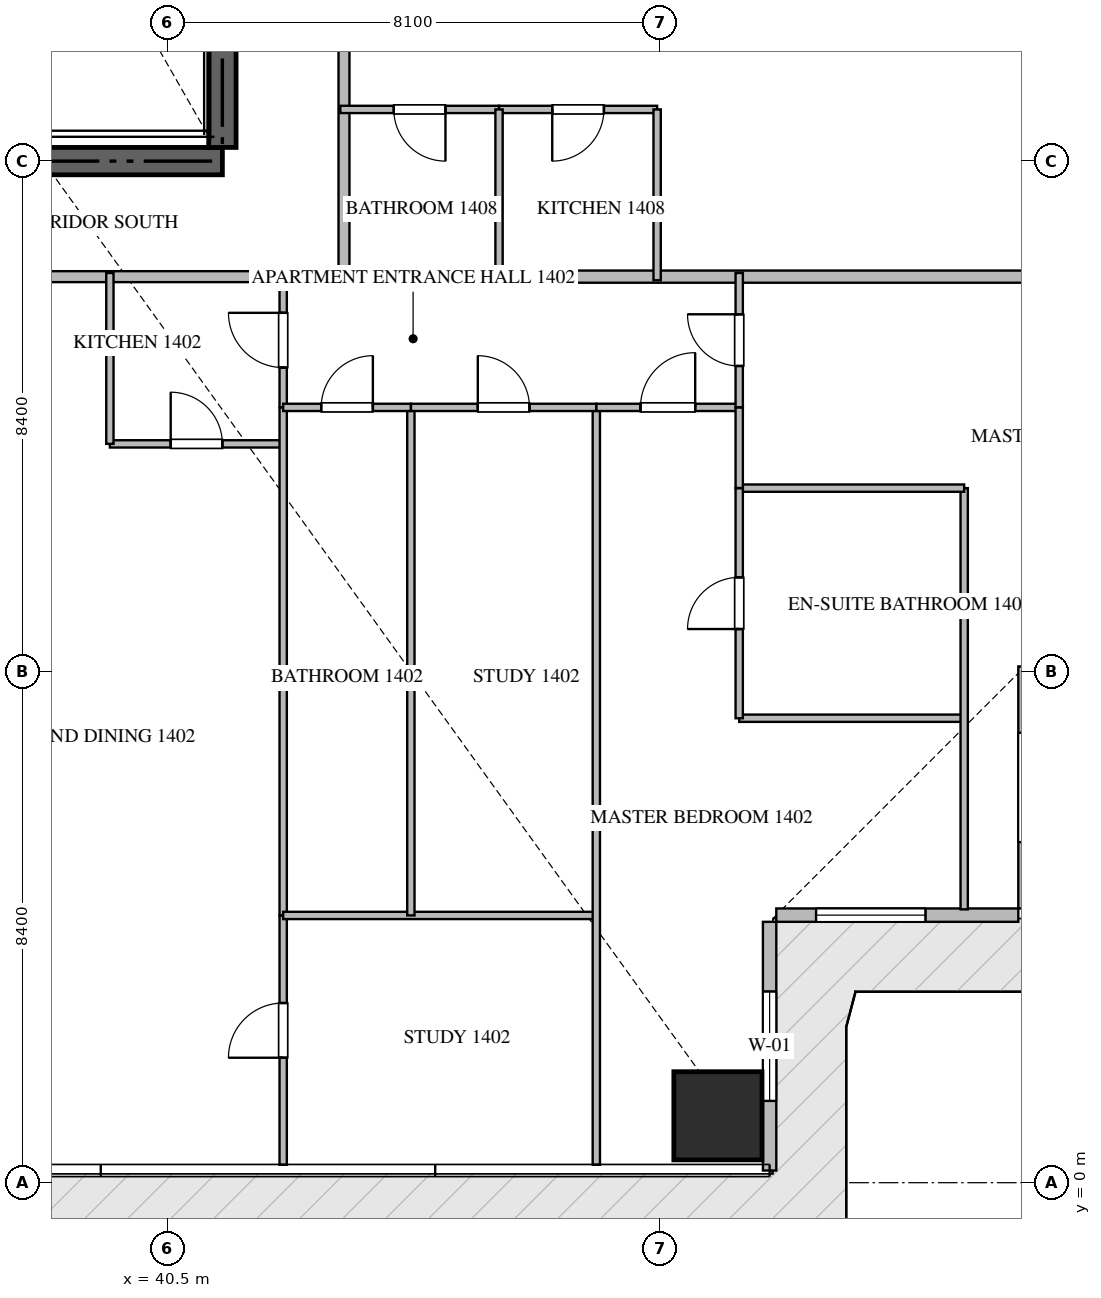
"""IFC4 building model, lengths in metres.
Left out: names, types, materials, properties, quantities, classifications, styles, units other than length and angle.
Written with IfcOpenShell. Run it as: python <this file> out.ifc"""

import sys

from ifc_helpers import new_model, si_unit, direction, frame, frame_2d, origin, origin_2d, place, context, subcontext, project, spatial, rectangle, extrude, source, transform, mapped, element, fill, save


model = new_model("IFC4")
c1 = context("Model", 3, precision=1e-05, world=origin(), true_north=direction((0.0, 1.0)))
c2 = subcontext(c1, "Body", "Model", "MODEL_VIEW")
j1 = project(units=[si_unit("LENGTHUNIT", "METRE"), si_unit("PLANEANGLEUNIT", "RADIAN")], contexts=[c1])
p1 = place(None, origin())
s1 = spatial("IfcSite", under=j1, at=p1, CompositionType="ELEMENT")
p2 = place(p1, origin())
s2 = spatial("IfcBuilding", under=s1, at=p2, CompositionType="ELEMENT")
p3 = place(p2, frame((0.0, 0.0, 60.45)))
s3 = spatial("IfcBuildingStorey", under=s2, at=p3, CompositionType="ELEMENT", Elevation=60.45)
p4 = place(p3, frame((23.4, 16.8, -0.26), z_axis=(0.0, 0.0, 1.0), x_axis=(1.0, 0.0, 0.0)))
e1 = element("IfcWall", 1, at=p4, inside=s3, PredefinedType="SHEAR", context=c2, shape_type="SweptSolid", body=[
    extrude(rectangle(XDim=18.0, YDim=0.45, at=frame_2d((9.0, 0.0))), origin(), (0.0, 0.0, 1.0), 3.748),
])
p5 = place(p3, frame((41.4, 17.025, -0.26), z_axis=(0.0, 0.0, 1.0), x_axis=(0.0, 1.0, 0.0)))
e2 = element("IfcWall", 2, at=p5, inside=s3, PredefinedType="SHEAR", context=c2, shape_type="SweptSolid", body=[
    extrude(rectangle(XDim=8.325, YDim=0.45, at=frame_2d((4.163, 0.0))), origin(), (0.0, 0.0, 1.0), 3.748),
])
m1 = source(origin(), c2, "Body", "SweptSolid", [
    extrude(rectangle(XDim=1.45, YDim=1.45, at=origin_2d()), origin(), (0.0, 0.0, 1.0), 3.75),
])
p6 = place(p3, frame((49.55, 1.1, -0.26), z_axis=(0.0, 0.0, 1.0), x_axis=(1.0, 0.0, 0.0)))
e3 = element("IfcColumn", 3, at=p6, inside=s3, PredefinedType="COLUMN", context=c2, shape_type="MappedRepresentation", body=[
    mapped(m1, transform((0.0, 0.0, 0.0), scale=1.0)),
])
p7 = place(p3, frame((50.4, 0.2, 0.0), z_axis=(0.0, 0.0, 1.0), x_axis=(0.0, 1.0, 0.0)))
e4 = element("IfcWall", 4, at=p7, inside=s3, PredefinedType="ELEMENTEDWALL", context=c2, shape_type="SweptSolid", body=[
    extrude(rectangle(XDim=4.09, YDim=0.22, at=frame_2d((2.045, 0.0))), origin(), (0.0, 0.0, 1.0), 3.475),
])
p8 = place(p7, frame((1.145, 0.0, 0.65)))
e5 = element("IfcOpeningElement", 5, at=p8, cuts=e4, PredefinedType="OPENING", context=c2, shape_type="SweptSolid", body=[
    extrude(rectangle(XDim=1.8, YDim=2.1, at=frame_2d((0.9, 1.05))), frame((0.0, 0.12, 0.0), z_axis=(0.0, -1.0, 0.0), x_axis=(1.0, 0.0, 0.0)), (0.0, 0.0, 1.0), 0.24),
])
p9 = place(p3, frame((50.51, 4.4, 0.0), z_axis=(0.0, 0.0, 1.0), x_axis=(1.0, 0.0, 0.0)))
e6 = element("IfcWall", 6, at=p9, inside=s3, PredefinedType="ELEMENTEDWALL", context=c2, shape_type="SweptSolid", body=[
    extrude(rectangle(XDim=3.98, YDim=0.22, at=frame_2d((1.99, 0.0))), origin(), (0.0, 0.0, 1.0), 3.475),
])
p10 = place(p9, frame((0.654, 0.0, 0.65)))
e7 = element("IfcOpeningElement", 7, at=p10, cuts=e6, PredefinedType="OPENING", context=c2, shape_type="SweptSolid", body=[
    extrude(rectangle(XDim=1.8, YDim=2.1, at=frame_2d((0.9, 1.05))), frame((0.0, 0.12, 0.0), z_axis=(0.0, -1.0, 0.0), x_axis=(1.0, 0.0, 0.0)), (0.0, 0.0, 1.0), 0.24),
])
p11 = place(p3, frame((54.6, 4.51, 0.0), z_axis=(0.0, 0.0, 1.0), x_axis=(0.0, 1.0, 0.0)))
e8 = element("IfcWall", 8, at=p11, inside=s3, PredefinedType="ELEMENTEDWALL", context=c2, shape_type="SweptSolid", body=[
    extrude(rectangle(XDim=3.98, YDim=0.22, at=frame_2d((1.99, 0.0))), origin(), (0.0, 0.0, 1.0), 3.475),
])
p12 = place(p11, frame((1.09, 0.0, 0.65)))
e9 = element("IfcOpeningElement", 9, at=p12, cuts=e8, PredefinedType="OPENING", context=c2, shape_type="SweptSolid", body=[
    extrude(rectangle(XDim=1.8, YDim=2.1, at=frame_2d((0.9, 1.05))), frame((0.0, 0.12, 0.0), z_axis=(0.0, -1.0, 0.0), x_axis=(1.0, 0.0, 0.0)), (0.0, 0.0, 1.0), 0.24),
])
p13 = place(p3, frame((43.4, 14.9, 0.0), z_axis=(0.0, 0.0, 1.0), x_axis=(1.0, 0.0, 0.0)))
e10 = element("IfcWall", 10, at=p13, inside=s3, PredefinedType="PARTITIONING", context=c2, shape_type="SweptSolid", body=[
    extrude(rectangle(XDim=15.318, YDim=0.2, at=frame_2d((7.659, 0.0))), origin(), (0.0, 0.0, 1.0), 3.49),
])
p14 = place(p3, frame((21.402, 14.9, 0.0), z_axis=(0.0, 0.0, 1.0), x_axis=(1.0, 0.0, 0.0)))
e11 = element("IfcWall", 11, at=p14, inside=s3, PredefinedType="PARTITIONING", context=c2, shape_type="SweptSolid", body=[
    extrude(rectangle(XDim=21.996, YDim=0.18, at=frame_2d((10.998, 0.0))), origin(), (0.0, 0.0, 1.0), 3.49),
])
p15 = place(p14, frame((9.742, 0.0, 0.0)))
e12 = element("IfcOpeningElement", 12, at=p15, cuts=e11, PredefinedType="OPENING", context=c2, shape_type="SweptSolid", body=[
    extrude(rectangle(XDim=1.0, YDim=2.15, at=frame_2d((0.5, 1.075))), frame((0.0, 0.1, 0.0), z_axis=(0.0, -1.0, 0.0), x_axis=(1.0, 0.0, 0.0)), (0.0, 0.0, 1.0), 0.2),
])
p16 = place(p14, frame((14.781, 0.0, 0.0)))
e13 = element("IfcOpeningElement", 13, at=p16, cuts=e11, PredefinedType="OPENING", context=c2, shape_type="SweptSolid", body=[
    extrude(rectangle(XDim=1.0, YDim=2.15, at=frame_2d((0.5, 1.075))), frame((0.0, 0.1, 0.0), z_axis=(0.0, -1.0, 0.0), x_axis=(1.0, 0.0, 0.0)), (0.0, 0.0, 1.0), 0.2),
])
p17 = place(p3, frame((43.4, 14.9, 0.0), z_axis=(0.0, 0.0, 1.0), x_axis=(0.0, 1.0, 0.0)))
e14 = element("IfcWall", 14, at=p17, inside=s3, PredefinedType="PARTITIONING", context=c2, shape_type="SweptSolid", body=[
    extrude(rectangle(XDim=20.6, YDim=0.18, at=frame_2d((10.3, 0.0))), origin(), (0.0, 0.0, 1.0), 3.49),
])
p18 = place(p17, frame((5.429, 0.0, 0.0)))
e15 = element("IfcOpeningElement", 15, at=p18, cuts=e14, PredefinedType="OPENING", context=c2, shape_type="SweptSolid", body=[
    extrude(rectangle(XDim=1.0, YDim=2.15, at=frame_2d((0.5, 1.075))), frame((0.0, 0.1, 0.0), z_axis=(0.0, -1.0, 0.0), x_axis=(1.0, 0.0, 0.0)), (0.0, 0.0, 1.0), 0.2),
])
p19 = place(p17, frame((10.506, 0.0, 0.0)))
e16 = element("IfcOpeningElement", 16, at=p19, cuts=e14, PredefinedType="OPENING", context=c2, shape_type="SweptSolid", body=[
    extrude(rectangle(XDim=1.0, YDim=2.15, at=frame_2d((0.5, 1.075))), frame((0.0, 0.1, 0.0), z_axis=(0.0, -1.0, 0.0), x_axis=(1.0, 0.0, 0.0)), (0.0, 0.0, 1.0), 0.2),
])
p20 = place(p3, frame((39.55, 12.15, 0.0), z_axis=(0.0, 0.0, 1.0), x_axis=(1.0, 0.0, 0.0)))
e17 = element("IfcWall", 17, at=p20, inside=s3, PredefinedType="PARTITIONING", context=c2, shape_type="SweptSolid", body=[
    extrude(rectangle(XDim=2.85, YDim=0.12, at=frame_2d((1.425, 0.0))), origin(), (0.0, 0.0, 1.0), 3.49),
])
p21 = place(p20, frame((1.0, 0.0, 0.0)))
e18 = element("IfcOpeningElement", 18, at=p21, cuts=e17, PredefinedType="OPENING", context=c2, shape_type="SweptSolid", body=[
    extrude(rectangle(XDim=0.85, YDim=2.1, at=frame_2d((0.425, 1.05))), frame((0.0, 0.07, 0.0), z_axis=(0.0, -1.0, 0.0), x_axis=(1.0, 0.0, 0.0)), (0.0, 0.0, 1.0), 0.14),
])
p22 = place(p3, frame((39.55, 12.15, 0.0), z_axis=(0.0, 0.0, 1.0), x_axis=(0.0, 1.0, 0.0)))
e19 = element("IfcWall", 19, at=p22, inside=s3, PredefinedType="PARTITIONING", context=c2, shape_type="SweptSolid", body=[
    extrude(rectangle(XDim=2.81, YDim=0.12, at=frame_2d((1.405, 0.0))), origin(), (0.0, 0.0, 1.0), 3.49),
])
p23 = place(p3, frame((42.4, 12.75, 0.0), z_axis=(0.0, 0.0, 1.0), x_axis=(0.0, 1.0, 0.0)))
e20 = element("IfcWall", 20, at=p23, inside=s3, PredefinedType="PARTITIONING", context=c2, shape_type="SweptSolid", body=[
    extrude(rectangle(XDim=2.21, YDim=0.12, at=frame_2d((1.105, 0.0))), origin(), (0.0, 0.0, 1.0), 3.49),
])
p24 = place(p23, frame((0.655, 0.0, 0.0)))
e21 = element("IfcOpeningElement", 21, at=p24, cuts=e20, PredefinedType="OPENING", context=c2, shape_type="SweptSolid", body=[
    extrude(rectangle(XDim=0.9, YDim=2.1, at=frame_2d((0.45, 1.05))), frame((0.0, 0.07, 0.0), z_axis=(0.0, -1.0, 0.0), x_axis=(1.0, 0.0, 0.0)), (0.0, 0.0, 1.0), 0.14),
])
p25 = place(p3, frame((42.4, 0.295, 0.0), z_axis=(0.0, 0.0, 1.0), x_axis=(0.0, 1.0, 0.0)))
e22 = element("IfcWall", 22, at=p25, inside=s3, PredefinedType="PARTITIONING", context=c2, shape_type="SweptSolid", body=[
    extrude(rectangle(XDim=4.1, YDim=0.12, at=frame_2d((2.05, 0.0))), origin(), (0.0, 0.0, 1.0), 3.49),
])
p26 = place(p25, frame((1.76, 0.0, 0.0)))
e23 = element("IfcOpeningElement", 23, at=p26, cuts=e22, PredefinedType="OPENING", context=c2, shape_type="SweptSolid", body=[
    extrude(rectangle(XDim=0.9, YDim=2.1, at=frame_2d((0.45, 1.05))), frame((0.0, 0.07, 0.0), z_axis=(0.0, -1.0, 0.0), x_axis=(1.0, 0.0, 0.0)), (0.0, 0.0, 1.0), 0.14),
])
p27 = place(p3, frame((42.4, 4.397, 0.0), z_axis=(0.0, 0.0, 1.0), x_axis=(0.0, 1.0, 0.0)))
e24 = element("IfcWall", 24, at=p27, inside=s3, PredefinedType="PARTITIONING", context=c2, shape_type="SweptSolid", body=[
    extrude(rectangle(XDim=8.351, YDim=0.12, at=frame_2d((4.176, 0.0))), origin(), (0.0, 0.0, 1.0), 3.49),
])
p28 = place(p3, frame((42.4, 4.395, 0.0), z_axis=(0.0, 0.0, 1.0), x_axis=(1.0, 0.0, 0.0)))
e25 = element("IfcWall", 25, at=p28, inside=s3, PredefinedType="PARTITIONING", context=c2, shape_type="SweptSolid", body=[
    extrude(rectangle(XDim=5.15, YDim=0.12, at=frame_2d((2.575, 0.0))), origin(), (0.0, 0.0, 1.0), 3.49),
])
p29 = place(p3, frame((47.55, 0.295, 0.0), z_axis=(0.0, 0.0, 1.0), x_axis=(0.0, 1.0, 0.0)))
e26 = element("IfcWall", 26, at=p29, inside=s3, PredefinedType="PARTITIONING", context=c2, shape_type="SweptSolid", body=[
    extrude(rectangle(XDim=12.455, YDim=0.12, at=frame_2d((6.228, 0.0))), origin(), (0.0, 0.0, 1.0), 3.49),
])
p30 = place(p3, frame((44.5, 4.395, 0.0), z_axis=(0.0, 0.0, 1.0), x_axis=(0.0, 1.0, 0.0)))
e27 = element("IfcWall", 27, at=p30, inside=s3, PredefinedType="PARTITIONING", context=c2, shape_type="SweptSolid", body=[
    extrude(rectangle(XDim=8.355, YDim=0.12, at=frame_2d((4.177, 0.0))), origin(), (0.0, 0.0, 1.0), 3.49),
])
p31 = place(p3, frame((42.4, 12.75, 0.0), z_axis=(0.0, 0.0, 1.0), x_axis=(1.0, 0.0, 0.0)))
e28 = element("IfcWall", 28, at=p31, inside=s3, PredefinedType="PARTITIONING", context=c2, shape_type="SweptSolid", body=[
    extrude(rectangle(XDim=2.1, YDim=0.12, at=frame_2d((1.05, 0.0))), origin(), (0.0, 0.0, 1.0), 3.49),
])
p32 = place(p31, frame((0.625, 0.0, 0.0)))
e29 = element("IfcOpeningElement", 29, at=p32, cuts=e28, PredefinedType="OPENING", context=c2, shape_type="SweptSolid", body=[
    extrude(rectangle(XDim=0.85, YDim=2.1, at=frame_2d((0.425, 1.05))), frame((0.0, 0.07, 0.0), z_axis=(0.0, -1.0, 0.0), x_axis=(1.0, 0.0, 0.0)), (0.0, 0.0, 1.0), 0.14),
])
p33 = place(p3, frame((44.502, 12.75, 0.0), z_axis=(0.0, 0.0, 1.0), x_axis=(1.0, 0.0, 0.0)))
e30 = element("IfcWall", 30, at=p33, inside=s3, PredefinedType="PARTITIONING", context=c2, shape_type="SweptSolid", body=[
    extrude(rectangle(XDim=3.048, YDim=0.12, at=frame_2d((1.524, 0.0))), origin(), (0.0, 0.0, 1.0), 3.49),
])
p34 = place(p33, frame((1.099, 0.0, 0.0)))
e31 = element("IfcOpeningElement", 31, at=p34, cuts=e30, PredefinedType="OPENING", context=c2, shape_type="SweptSolid", body=[
    extrude(rectangle(XDim=0.85, YDim=2.1, at=frame_2d((0.425, 1.05))), frame((0.0, 0.07, 0.0), z_axis=(0.0, -1.0, 0.0), x_axis=(1.0, 0.0, 0.0)), (0.0, 0.0, 1.0), 0.14),
])
p35 = place(p3, frame((47.552, 12.75, 0.0), z_axis=(0.0, 0.0, 1.0), x_axis=(1.0, 0.0, 0.0)))
e32 = element("IfcWall", 32, at=p35, inside=s3, PredefinedType="PARTITIONING", context=c2, shape_type="SweptSolid", body=[
    extrude(rectangle(XDim=2.348, YDim=0.12, at=frame_2d((1.174, 0.0))), origin(), (0.0, 0.0, 1.0), 3.49),
])
p36 = place(p35, frame((0.724, 0.0, 0.0)))
e33 = element("IfcOpeningElement", 33, at=p36, cuts=e32, PredefinedType="OPENING", context=c2, shape_type="SweptSolid", body=[
    extrude(rectangle(XDim=0.9, YDim=2.1, at=frame_2d((0.45, 1.05))), frame((0.0, 0.07, 0.0), z_axis=(0.0, -1.0, 0.0), x_axis=(1.0, 0.0, 0.0)), (0.0, 0.0, 1.0), 0.14),
])
p37 = place(p3, frame((49.9, 7.638, 0.0), z_axis=(0.0, 0.0, 1.0), x_axis=(1.0, 0.0, 0.0)))
e34 = element("IfcWall", 34, at=p37, inside=s3, PredefinedType="PARTITIONING", context=c2, shape_type="SweptSolid", body=[
    extrude(rectangle(XDim=3.7, YDim=0.12, at=frame_2d((1.85, 0.0))), origin(), (0.0, 0.0, 1.0), 3.49),
])
p38 = place(p3, frame((53.6, 4.495, 0.0), z_axis=(0.0, 0.0, 1.0), x_axis=(0.0, 1.0, 0.0)))
e35 = element("IfcWall", 35, at=p38, inside=s3, PredefinedType="PARTITIONING", context=c2, shape_type="SweptSolid", body=[
    extrude(rectangle(XDim=6.927, YDim=0.12, at=frame_2d((3.463, 0.0))), origin(), (0.0, 0.0, 1.0), 3.49),
])
p39 = place(p3, frame((49.9, 11.422, 0.0), z_axis=(0.0, 0.0, 1.0), x_axis=(1.0, 0.0, 0.0)))
e36 = element("IfcWall", 36, at=p39, inside=s3, PredefinedType="PARTITIONING", context=c2, shape_type="SweptSolid", body=[
    extrude(rectangle(XDim=3.7, YDim=0.12, at=frame_2d((1.85, 0.0))), origin(), (0.0, 0.0, 1.0), 3.49),
])
p40 = place(p3, frame((49.9, 7.638, 0.0), z_axis=(0.0, 0.0, 1.0), x_axis=(0.0, 1.0, 0.0)))
e37 = element("IfcWall", 37, at=p40, inside=s3, PredefinedType="PARTITIONING", context=c2, shape_type="SweptSolid", body=[
    extrude(rectangle(XDim=3.784, YDim=0.12, at=frame_2d((1.892, 0.0))), origin(), (0.0, 0.0, 1.0), 3.49),
])
p41 = place(p40, frame((1.467, 0.0, 0.0)))
e38 = element("IfcOpeningElement", 38, at=p41, cuts=e37, PredefinedType="OPENING", context=c2, shape_type="SweptSolid", body=[
    extrude(rectangle(XDim=0.85, YDim=2.1, at=frame_2d((0.425, 1.05))), frame((0.0, 0.07, 0.0), z_axis=(0.0, -1.0, 0.0), x_axis=(1.0, 0.0, 0.0)), (0.0, 0.0, 1.0), 0.14),
])
p42 = place(p3, frame((49.9, 11.424, 0.0), z_axis=(0.0, 0.0, 1.0), x_axis=(0.0, 1.0, 0.0)))
e39 = element("IfcWall", 39, at=p42, inside=s3, PredefinedType="PARTITIONING", context=c2, shape_type="SweptSolid", body=[
    extrude(rectangle(XDim=1.326, YDim=0.12, at=frame_2d((0.663, 0.0))), origin(), (0.0, 0.0, 1.0), 3.49),
])
p43 = place(p3, frame((49.9, 12.752, 0.0), z_axis=(0.0, 0.0, 1.0), x_axis=(0.0, 1.0, 0.0)))
e40 = element("IfcWall", 40, at=p43, inside=s3, PredefinedType="PARTITIONING", context=c2, shape_type="SweptSolid", body=[
    extrude(rectangle(XDim=2.208, YDim=0.12, at=frame_2d((1.104, 0.0))), origin(), (0.0, 0.0, 1.0), 3.49),
])
p44 = place(p43, frame((0.679, 0.0, 0.0)))
e41 = element("IfcOpeningElement", 41, at=p44, cuts=e40, PredefinedType="OPENING", context=c2, shape_type="SweptSolid", body=[
    extrude(rectangle(XDim=0.85, YDim=2.1, at=frame_2d((0.425, 1.05))), frame((0.0, 0.07, 0.0), z_axis=(0.0, -1.0, 0.0), x_axis=(1.0, 0.0, 0.0)), (0.0, 0.0, 1.0), 0.14),
])
p45 = place(p3, frame((48.55, 17.65, 0.0), z_axis=(0.0, 0.0, 1.0), x_axis=(-1.0, 0.0, 0.0)))
e42 = element("IfcWall", 42, at=p45, inside=s3, PredefinedType="PARTITIONING", context=c2, shape_type="SweptSolid", body=[
    extrude(rectangle(XDim=2.6, YDim=0.12, at=frame_2d((1.3, 0.0))), origin(), (0.0, 0.0, 1.0), 3.49),
])
p46 = place(p45, frame((0.875, 0.0, 0.0)))
e43 = element("IfcOpeningElement", 43, at=p46, cuts=e42, PredefinedType="OPENING", context=c2, shape_type="SweptSolid", body=[
    extrude(rectangle(XDim=0.85, YDim=2.1, at=frame_2d((0.425, 1.05))), frame((0.0, 0.07, 0.0), z_axis=(0.0, -1.0, 0.0), x_axis=(1.0, 0.0, 0.0)), (0.0, 0.0, 1.0), 0.14),
])
p47 = place(p3, frame((45.948, 17.65, 0.0), z_axis=(0.0, 0.0, 1.0), x_axis=(-1.0, 0.0, 0.0)))
e44 = element("IfcWall", 44, at=p47, inside=s3, PredefinedType="PARTITIONING", context=c2, shape_type="SweptSolid", body=[
    extrude(rectangle(XDim=2.608, YDim=0.12, at=frame_2d((1.304, 0.0))), origin(), (0.0, 0.0, 1.0), 3.49),
])
p48 = place(p47, frame((0.879, 0.0, 0.0)))
e45 = element("IfcOpeningElement", 45, at=p48, cuts=e44, PredefinedType="OPENING", context=c2, shape_type="SweptSolid", body=[
    extrude(rectangle(XDim=0.85, YDim=2.1, at=frame_2d((0.425, 1.05))), frame((0.0, 0.07, 0.0), z_axis=(0.0, -1.0, 0.0), x_axis=(1.0, 0.0, 0.0)), (0.0, 0.0, 1.0), 0.14),
])
for number, where, z_axis, x_axis in (
    (46, (45.95, 14.84, 0.0), (0.0, 0.0, 1.0), (0.0, 1.0, 0.0)),
    (47, (48.55, 14.84, 0.0), (0.0, 0.0, 1.0), (0.0, 1.0, 0.0)),
):
    element("IfcWall", number, at=place(p3, frame(where, z_axis=z_axis, x_axis=x_axis)), inside=s3, PredefinedType="PARTITIONING", context=c2, shape_type="SweptSolid", body=[
        extrude(rectangle(XDim=2.81, YDim=0.12, at=frame_2d((1.405, 0.0))), origin(), (0.0, 0.0, 1.0), 3.49),
    ])
m2 = source(origin(), c2, "Body", "SweptSolid", [
    extrude(rectangle(XDim=1.8, YDim=2.1, at=frame_2d((0.9, 1.05))), frame((0.0, 0.03, 0.0), z_axis=(0.0, -1.0, 0.0), x_axis=(1.0, 0.0, 0.0)), (0.0, 0.0, 1.0), 0.06),
])
p49 = place(p8, origin())
e48 = element("IfcWindow", 48, at=p49, inside=s3, PartitioningType="SINGLE_PANEL", PredefinedType="WINDOW", context=c2, shape_type="MappedRepresentation", body=[
    mapped(m2, transform((0.0, 0.0, 0.0), scale=1.0)),
])
fill(e5, e48)
p50 = place(p10, origin())
e49 = element("IfcWindow", 49, at=p50, inside=s3, PartitioningType="SINGLE_PANEL", PredefinedType="WINDOW", context=c2, shape_type="MappedRepresentation", body=[
    mapped(m2, transform((0.0, 0.0, 0.0), scale=1.0)),
])
fill(e7, e49)
m3 = source(origin(), c2, "Body", "SweptSolid", [
    extrude(rectangle(XDim=0.85, YDim=2.1, at=frame_2d((0.425, 1.05))), frame((0.0, 0.025, 0.0), z_axis=(0.0, -1.0, 0.0), x_axis=(1.0, 0.0, 0.0)), (0.0, 0.0, 1.0), 0.05),
])
p51 = place(p21, origin())
e50 = element("IfcDoor", 50, at=p51, inside=s3, OperationType="SINGLE_SWING_LEFT", PredefinedType="DOOR", context=c2, shape_type="MappedRepresentation", body=[
    mapped(m3, transform((0.0, 0.0, 0.0), scale=1.0)),
])
fill(e18, e50)
m4 = source(origin(), c2, "Body", "SweptSolid", [
    extrude(rectangle(XDim=0.9, YDim=2.1, at=frame_2d((0.45, 1.05))), frame((0.0, 0.025, 0.0), z_axis=(0.0, -1.0, 0.0), x_axis=(1.0, 0.0, 0.0)), (0.0, 0.0, 1.0), 0.05),
])
p52 = place(p24, origin())
e51 = element("IfcDoor", 51, at=p52, inside=s3, OperationType="SINGLE_SWING_RIGHT", PredefinedType="DOOR", context=c2, shape_type="MappedRepresentation", body=[
    mapped(m4, transform((0.0, 0.0, 0.0), scale=1.0)),
])
fill(e21, e51)
p53 = place(p26, origin())
e52 = element("IfcDoor", 52, at=p53, inside=s3, OperationType="SINGLE_SWING_LEFT", PredefinedType="DOOR", context=c2, shape_type="MappedRepresentation", body=[
    mapped(m4, transform((0.0, 0.0, 0.0), scale=1.0)),
])
fill(e23, e52)
p54 = place(p32, origin())
e53 = element("IfcDoor", 53, at=p54, inside=s3, OperationType="SINGLE_SWING_RIGHT", PredefinedType="DOOR", context=c2, shape_type="MappedRepresentation", body=[
    mapped(m3, transform((0.0, 0.0, 0.0), scale=1.0)),
])
fill(e29, e53)
p55 = place(p34, origin())
e54 = element("IfcDoor", 54, at=p55, inside=s3, OperationType="SINGLE_SWING_LEFT", PredefinedType="DOOR", context=c2, shape_type="MappedRepresentation", body=[
    mapped(m3, transform((0.0, 0.0, 0.0), scale=1.0)),
])
fill(e31, e54)
p56 = place(p36, origin())
e55 = element("IfcDoor", 55, at=p56, inside=s3, OperationType="SINGLE_SWING_RIGHT", PredefinedType="DOOR", context=c2, shape_type="MappedRepresentation", body=[
    mapped(m4, transform((0.0, 0.0, 0.0), scale=1.0)),
])
fill(e33, e55)
p57 = place(p41, origin())
e56 = element("IfcDoor", 56, at=p57, inside=s3, OperationType="SINGLE_SWING_LEFT", PredefinedType="DOOR", context=c2, shape_type="MappedRepresentation", body=[
    mapped(m3, transform((0.0, 0.0, 0.0), scale=1.0)),
])
fill(e38, e56)
p58 = place(p44, origin())
e57 = element("IfcDoor", 57, at=p58, inside=s3, OperationType="SINGLE_SWING_RIGHT", PredefinedType="DOOR", context=c2, shape_type="MappedRepresentation", body=[
    mapped(m3, transform((0.0, 0.0, 0.0), scale=1.0)),
])
fill(e41, e57)
p59 = place(p46, origin())
e58 = element("IfcDoor", 58, at=p59, inside=s3, OperationType="SINGLE_SWING_RIGHT", PredefinedType="DOOR", context=c2, shape_type="MappedRepresentation", body=[
    mapped(m3, transform((0.0, 0.0, 0.0), scale=1.0)),
])
fill(e43, e58)
p60 = place(p48, origin())
e59 = element("IfcDoor", 59, at=p60, inside=s3, OperationType="SINGLE_SWING_LEFT", PredefinedType="DOOR", context=c2, shape_type="MappedRepresentation", body=[
    mapped(m3, transform((0.0, 0.0, 0.0), scale=1.0)),
])
fill(e45, e59)
save(model, sys.argv[1])
